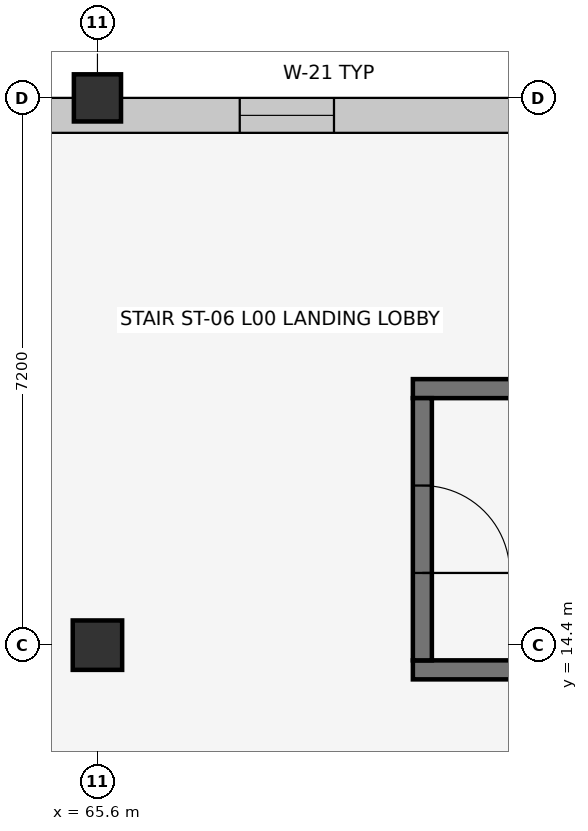
"""IFC4 building model, lengths in metres.
Left out: names, types, materials, properties, quantities, classifications, styles, units other than length and angle.
Written with IfcOpenShell. Run it as: python <this file> out.ifc"""

import sys

from ifc_helpers import new_model, si_unit, direction, frame, frame_2d, origin, origin_2d, place, context, subcontext, project, spatial, rectangle, extrude, element, fill, save


model = new_model("IFC4")
c1 = context("Model", 3, precision=1e-05, world=origin(), true_north=direction((0.0, 1.0)))
c2 = subcontext(c1, "Body", "Model", "MODEL_VIEW")
j1 = project(units=[si_unit("LENGTHUNIT", "METRE"), si_unit("PLANEANGLEUNIT", "RADIAN")], contexts=[c1])
p1 = place(None, origin())
s1 = spatial("IfcSite", under=j1, at=p1, CompositionType="ELEMENT")
p2 = place(p1, origin())
s2 = spatial("IfcBuilding", under=s1, at=p2, CompositionType="ELEMENT")
p3 = place(p2, origin())
s3 = spatial("IfcBuildingStorey", under=s2, at=p3, CompositionType="ELEMENT", Elevation=0.0)
p4 = place(p3, frame((65.6, 14.4, 0.0), z_axis=(0.0, 0.0, 1.0), x_axis=(1.0, 0.0, 0.0)))
e1 = element("IfcColumn", 1, at=p4, inside=s3, PredefinedType="COLUMN", context=c2, shape_type="SweptSolid", body=[
    extrude(rectangle(XDim=0.65, YDim=0.65, at=origin_2d()), origin(), (0.0, 0.0, 1.0), 5.4),
])
p5 = place(p3, frame((65.6, 21.6, 0.0), z_axis=(0.0, 0.0, 1.0), x_axis=(1.0, 0.0, 0.0)))
e2 = element("IfcColumn", 2, at=p5, inside=s3, PredefinedType="COLUMN", context=c2, shape_type="SweptSolid", body=[
    extrude(rectangle(XDim=0.62, YDim=0.62, at=origin_2d()), origin(), (0.0, 0.0, 1.0), 5.4),
])
p6 = place(p3, frame((58.4, 21.37, 0.0), z_axis=(0.0, 0.0, 1.0), x_axis=(1.0, 0.0, 0.0)))
e3 = element("IfcWall", 3, at=p6, inside=s3, PredefinedType="SOLIDWALL", context=c2, shape_type="SweptSolid", body=[
    extrude(rectangle(XDim=50.4, YDim=0.46, at=frame_2d((25.2, 0.0))), origin(), (0.0, 0.0, 1.0), 4.445),
])
p7 = place(p6, frame((45.4, 0.0, 0.0)))
e4 = element("IfcOpeningElement", 4, at=p7, cuts=e3, PredefinedType="OPENING", context=c2, shape_type="SweptSolid", body=[
    extrude(rectangle(XDim=2.0, YDim=2.35, at=frame_2d((1.0, 1.175))), frame((0.0, 0.242, 0.0), z_axis=(0.0, -1.0, 0.0), x_axis=(1.0, 0.0, 0.0)), (0.0, 0.0, 1.0), 0.484),
])
p8 = place(p6, frame((1.438, 0.0, 0.9)))
e5 = element("IfcOpeningElement", 5, at=p8, cuts=e3, PredefinedType="OPENING", context=c2, shape_type="SweptSolid", body=[
    extrude(rectangle(XDim=1.0, YDim=1.75, at=frame_2d((0.5, 0.875))), frame((0.0, 0.242, 0.0), z_axis=(0.0, -1.0, 0.0), x_axis=(1.0, 0.0, 0.0)), (0.0, 0.0, 1.0), 0.484),
])
p9 = place(p6, frame((9.072, 0.0, 0.9)))
e6 = element("IfcOpeningElement", 6, at=p9, cuts=e3, PredefinedType="OPENING", context=c2, shape_type="SweptSolid", body=[
    extrude(rectangle(XDim=1.24, YDim=1.75, at=frame_2d((0.62, 0.875))), frame((0.0, 0.242, 0.0), z_axis=(0.0, -1.0, 0.0), x_axis=(1.0, 0.0, 0.0)), (0.0, 0.0, 1.0), 0.484),
])
p10 = place(p6, frame((16.726, 0.0, 0.9)))
e7 = element("IfcOpeningElement", 7, at=p10, cuts=e3, PredefinedType="OPENING", context=c2, shape_type="SweptSolid", body=[
    extrude(rectangle(XDim=1.44, YDim=1.75, at=frame_2d((0.72, 0.875))), frame((0.0, 0.242, 0.0), z_axis=(0.0, -1.0, 0.0), x_axis=(1.0, 0.0, 0.0)), (0.0, 0.0, 1.0), 0.484),
])
p11 = place(p6, frame((24.75, 0.0, 0.9)))
e8 = element("IfcOpeningElement", 8, at=p11, cuts=e3, PredefinedType="OPENING", context=c2, shape_type="SweptSolid", body=[
    extrude(rectangle(XDim=0.9, YDim=1.35, at=frame_2d((0.45, 0.675))), frame((0.0, 0.242, 0.0), z_axis=(0.0, -1.0, 0.0), x_axis=(1.0, 0.0, 0.0)), (0.0, 0.0, 1.0), 0.484),
])
p12 = place(p6, frame((40.058, 0.0, 0.9)))
e9 = element("IfcOpeningElement", 9, at=p12, cuts=e3, PredefinedType="OPENING", context=c2, shape_type="SweptSolid", body=[
    extrude(rectangle(XDim=1.3, YDim=1.35, at=frame_2d((0.65, 0.675))), frame((0.0, 0.242, 0.0), z_axis=(0.0, -1.0, 0.0), x_axis=(1.0, 0.0, 0.0)), (0.0, 0.0, 1.0), 0.484),
])
for number, where, z_axis, x_axis in (
    (10, (69.75, 14.075, 0.0), (0.0, 0.0, 1.0), (1.0, 0.0, 0.0)),
    (11, (78.65, 17.775, 0.0), (0.0, 0.0, 1.0), (-1.0, 0.0, 0.0)),
):
    element("IfcWall", number, at=place(p3, frame(where, z_axis=z_axis, x_axis=x_axis)), inside=s3, PredefinedType="SHEAR", context=c2, shape_type="SweptSolid", body=[
        extrude(rectangle(XDim=8.9, YDim=0.25, at=frame_2d((4.45, 0.0))), origin(), (0.0, 0.0, 1.0), 5.15),
    ])
p13 = place(p3, frame((69.875, 17.65, 0.0), z_axis=(0.0, 0.0, 1.0), x_axis=(0.0, -1.0, 0.0)))
e12 = element("IfcWall", 12, at=p13, inside=s3, PredefinedType="SHEAR", context=c2, shape_type="SweptSolid", body=[
    extrude(rectangle(XDim=3.45, YDim=0.25, at=frame_2d((1.725, 0.0))), origin(), (0.0, 0.0, 1.0), 5.15),
])
p14 = place(p13, frame((1.15, 0.0, 0.0)))
e13 = element("IfcOpeningElement", 13, at=p14, cuts=e12, PredefinedType="OPENING", context=c2, shape_type="SweptSolid", body=[
    extrude(rectangle(XDim=1.15, YDim=2.15, at=frame_2d((0.575, 1.075))), frame((0.0, 0.137, 0.0), z_axis=(0.0, -1.0, 0.0), x_axis=(1.0, 0.0, 0.0)), (0.0, 0.0, 1.0), 0.274),
])
p15 = place(p9, origin())
e14 = element("IfcWindow", 14, at=p15, inside=s3, PartitioningType="SINGLE_PANEL", PredefinedType="WINDOW", context=c2, shape_type="SweptSolid", body=[
    extrude(rectangle(XDim=1.24, YDim=1.75, at=frame_2d((0.62, 0.875))), frame((0.0, 0.03, 0.0), z_axis=(0.0, -1.0, 0.0), x_axis=(1.0, 0.0, 0.0)), (0.0, 0.0, 1.0), 0.06),
])
fill(e6, e14)
p16 = place(p14, origin())
e15 = element("IfcDoor", 15, at=p16, inside=s3, OperationType="SINGLE_SWING_RIGHT", PredefinedType="DOOR", context=c2, shape_type="SweptSolid", body=[
    extrude(rectangle(XDim=1.15, YDim=2.15, at=frame_2d((0.575, 1.075))), frame((0.0, 0.025, 0.0), z_axis=(0.0, -1.0, 0.0), x_axis=(1.0, 0.0, 0.0)), (0.0, 0.0, 1.0), 0.05),
])
fill(e13, e15)
save(model, sys.argv[1])
